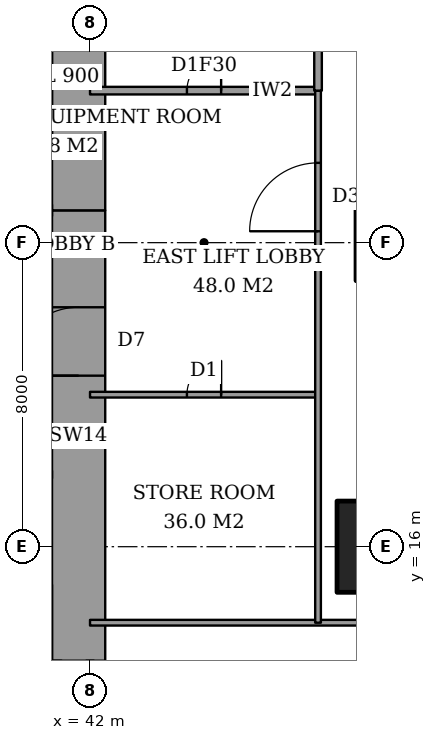
"""IFC4 building model, lengths in metres.
Left out: names, types, materials, properties, quantities, classifications, styles, units other than length and angle.
Written with IfcOpenShell. Run it as: python <this file> out.ifc"""

import sys

from ifc_helpers import new_model, si_unit, direction, frame, frame_2d, origin, origin_2d, place, context, subcontext, project, spatial, rectangle, extrude, element, fill, save


model = new_model("IFC4")
c1 = context("Model", 3, precision=1e-05, world=origin(), true_north=direction((0.0, 1.0)))
c2 = subcontext(c1, "Body", "Model", "MODEL_VIEW")
j1 = project(units=[si_unit("LENGTHUNIT", "METRE"), si_unit("PLANEANGLEUNIT", "RADIAN")], contexts=[c1])
p1 = place(None, origin())
s1 = spatial("IfcSite", under=j1, at=p1, CompositionType="ELEMENT")
p2 = place(p1, origin())
s2 = spatial("IfcBuilding", under=s1, at=p2, CompositionType="ELEMENT")
p3 = place(p2, frame((0.0, 0.0, 11.0)))
s3 = spatial("IfcBuildingStorey", under=s2, at=p3, CompositionType="ELEMENT", Elevation=11.0)
p4 = place(p3, frame((50.0, 16.0, 0.0), z_axis=(0.0, 0.0, 1.0), x_axis=(1.0, 0.0, 0.0)))
e1 = element("IfcColumn", 1, at=p4, inside=s3, PredefinedType="COLUMN", context=c2, shape_type="SweptSolid", body=[
    extrude(rectangle(XDim=3.0, YDim=2.4, at=origin_2d()), origin(), (0.0, 0.0, 1.0), 5.0),
])
p5 = place(p3, frame((41.7, 13.0, 0.0), z_axis=(0.0, 0.0, 1.0), x_axis=(0.0, 1.0, 0.0)))
e2 = element("IfcWall", 2, at=p5, inside=s3, PredefinedType="SHEAR", context=c2, shape_type="SweptSolid", body=[
    extrude(rectangle(XDim=11.85, YDim=1.4, at=frame_2d((5.925, 0.0))), origin(), (0.0, 0.0, 1.0), 5.0),
])
p6 = place(p5, frame((7.5, 0.0, 0.0)))
e3 = element("IfcOpeningElement", 3, at=p6, cuts=e2, PredefinedType="OPENING", context=c2, shape_type="SweptSolid", body=[
    extrude(rectangle(XDim=1.8, YDim=2.4, at=frame_2d((0.9, 1.2))), frame((0.0, 0.71, 0.0), z_axis=(0.0, -1.0, 0.0), x_axis=(1.0, 0.0, 0.0)), (0.0, 0.0, 1.0), 1.42),
])
p7 = place(p3, frame((41.7, 24.85, 0.0), z_axis=(0.0, 0.0, 1.0), x_axis=(0.0, 1.0, 0.0)))
e4 = element("IfcWall", 4, at=p7, inside=s3, PredefinedType="SHEAR", context=c2, shape_type="SweptSolid", body=[
    extrude(rectangle(XDim=10.15, YDim=1.4, at=frame_2d((5.075, 0.0))), origin(), (0.0, 0.0, 1.0), 5.0),
])
p8 = place(p3, frame((42.0, 14.0, 0.0), z_axis=(0.0, 0.0, 1.0), x_axis=(1.0, 0.0, 0.0)))
e5 = element("IfcWall", 5, at=p8, inside=s3, PredefinedType="PARTITIONING", context=c2, shape_type="SweptSolid", body=[
    extrude(rectangle(XDim=32.45, YDim=0.15, at=frame_2d((16.225, 0.0))), origin(), (0.0, 0.0, 1.0), 4.7),
])
p9 = place(p8, frame((11.137, 0.0, 0.0)))
e6 = element("IfcOpeningElement", 6, at=p9, cuts=e5, PredefinedType="OPENING", context=c2, shape_type="SweptSolid", body=[
    extrude(rectangle(XDim=1.0, YDim=2.1, at=frame_2d((0.5, 1.05))), frame((0.0, 0.085, 0.0), z_axis=(0.0, -1.0, 0.0), x_axis=(1.0, 0.0, 0.0)), (0.0, 0.0, 1.0), 0.17),
])
p10 = place(p8, frame((24.663, 0.0, 0.0)))
e7 = element("IfcOpeningElement", 7, at=p10, cuts=e5, PredefinedType="OPENING", context=c2, shape_type="SweptSolid", body=[
    extrude(rectangle(XDim=1.8, YDim=2.1, at=frame_2d((0.9, 1.05))), frame((0.0, 0.085, 0.0), z_axis=(0.0, -1.0, 0.0), x_axis=(1.0, 0.0, 0.0)), (0.0, 0.0, 1.0), 0.17),
])
p11 = place(p3, frame((42.0, 20.0, 0.0), z_axis=(0.0, 0.0, 1.0), x_axis=(1.0, 0.0, 0.0)))
e8 = element("IfcWall", 8, at=p11, inside=s3, PredefinedType="PARTITIONING", context=c2, shape_type="SweptSolid", body=[
    extrude(rectangle(XDim=6.0, YDim=0.15, at=frame_2d((3.0, 0.0))), origin(), (0.0, 0.0, 1.0), 4.7),
])
p12 = place(p11, frame((2.55, 0.0, 0.0)))
e9 = element("IfcOpeningElement", 9, at=p12, cuts=e8, PredefinedType="OPENING", context=c2, shape_type="SweptSolid", body=[
    extrude(rectangle(XDim=0.9, YDim=2.1, at=frame_2d((0.45, 1.05))), frame((0.0, 0.085, 0.0), z_axis=(0.0, -1.0, 0.0), x_axis=(1.0, 0.0, 0.0)), (0.0, 0.0, 1.0), 0.17),
])
p13 = place(p3, frame((42.0, 28.0, 0.0), z_axis=(0.0, 0.0, 1.0), x_axis=(1.0, 0.0, 0.0)))
e10 = element("IfcWall", 10, at=p13, inside=s3, PredefinedType="PARTITIONING", context=c2, shape_type="SweptSolid", body=[
    extrude(rectangle(XDim=6.0, YDim=0.2, at=frame_2d((3.0, 0.0))), origin(), (0.0, 0.0, 1.0), 4.7),
])
p14 = place(p13, frame((2.55, 0.0, 0.0)))
e11 = element("IfcOpeningElement", 11, at=p14, cuts=e10, PredefinedType="OPENING", context=c2, shape_type="SweptSolid", body=[
    extrude(rectangle(XDim=0.9, YDim=2.1, at=frame_2d((0.45, 1.05))), frame((0.0, 0.11, 0.0), z_axis=(0.0, -1.0, 0.0), x_axis=(1.0, 0.0, 0.0)), (0.0, 0.0, 1.0), 0.22),
])
p15 = place(p3, frame((41.15, -0.45, 0.0), z_axis=(0.0, 0.0, 1.0), x_axis=(0.0, 1.0, 0.0)))
e12 = element("IfcWall", 12, at=p15, inside=s3, PredefinedType="PARTITIONING", context=c2, shape_type="SweptSolid", body=[
    extrude(rectangle(XDim=13.45, YDim=0.2, at=frame_2d((6.725, 0.0))), origin(), (0.0, 0.0, 1.0), 4.7),
])
p16 = place(p3, frame((42.0, 9.3, 0.0), z_axis=(0.0, 0.0, 1.0), x_axis=(0.0, 1.0, 0.0)))
e13 = element("IfcWall", 13, at=p16, inside=s3, PredefinedType="PARTITIONING", context=c2, shape_type="SweptSolid", body=[
    extrude(rectangle(XDim=3.7, YDim=0.2, at=frame_2d((1.85, 0.0))), origin(), (0.0, 0.0, 1.0), 4.7),
])
p17 = place(p3, frame((48.0, 28.0, 0.0), z_axis=(0.0, 0.0, 1.0), x_axis=(0.0, 1.0, 0.0)))
e14 = element("IfcWall", 14, at=p17, inside=s3, PredefinedType="PARTITIONING", context=c2, shape_type="SweptSolid", body=[
    extrude(rectangle(XDim=1.4, YDim=0.2, at=frame_2d((0.7, 0.0))), origin(), (0.0, 0.0, 1.0), 4.7),
])
p18 = place(p3, frame((48.0, 14.0, 0.0), z_axis=(0.0, 0.0, 1.0), x_axis=(0.0, 1.0, 0.0)))
e15 = element("IfcWall", 15, at=p18, inside=s3, PredefinedType="PARTITIONING", context=c2, shape_type="SweptSolid", body=[
    extrude(rectangle(XDim=14.0, YDim=0.15, at=frame_2d((7.0, 0.0))), origin(), (0.0, 0.0, 1.0), 4.7),
])
p19 = place(p18, frame((10.3, 0.0, 0.0)))
e16 = element("IfcOpeningElement", 16, at=p19, cuts=e15, PredefinedType="OPENING", context=c2, shape_type="SweptSolid", body=[
    extrude(rectangle(XDim=1.8, YDim=2.1, at=frame_2d((0.9, 1.05))), frame((0.0, 0.085, 0.0), z_axis=(0.0, -1.0, 0.0), x_axis=(1.0, 0.0, 0.0)), (0.0, 0.0, 1.0), 0.17),
])
p20 = place(p3, frame((28.3, 17.9, 0.0), z_axis=(0.0, 0.0, 1.0), x_axis=(1.0, 0.0, 0.0)))
e17 = element("IfcWall", 17, at=p20, inside=s3, PredefinedType="PARTITIONING", context=c2, shape_type="SweptSolid", body=[
    extrude(rectangle(XDim=12.7, YDim=0.2, at=frame_2d((6.35, 0.0))), origin(), (0.0, 0.0, 1.0), 5.0),
])
p21 = place(p20, frame((0.95, 0.0, 0.0)))
e18 = element("IfcOpeningElement", 18, at=p21, cuts=e17, PredefinedType="OPENING", context=c2, shape_type="SweptSolid", body=[
    extrude(rectangle(XDim=1.1, YDim=2.1, at=frame_2d((0.55, 1.05))), frame((0.0, 0.11, 0.0), z_axis=(0.0, -1.0, 0.0), x_axis=(1.0, 0.0, 0.0)), (0.0, 0.0, 1.0), 0.22),
])
p22 = place(p20, frame((4.15, 0.0, 0.0)))
e19 = element("IfcOpeningElement", 19, at=p22, cuts=e17, PredefinedType="OPENING", context=c2, shape_type="SweptSolid", body=[
    extrude(rectangle(XDim=1.1, YDim=2.1, at=frame_2d((0.55, 1.05))), frame((0.0, 0.11, 0.0), z_axis=(0.0, -1.0, 0.0), x_axis=(1.0, 0.0, 0.0)), (0.0, 0.0, 1.0), 0.22),
])
p23 = place(p20, frame((7.35, 0.0, 0.0)))
e20 = element("IfcOpeningElement", 20, at=p23, cuts=e17, PredefinedType="OPENING", context=c2, shape_type="SweptSolid", body=[
    extrude(rectangle(XDim=1.1, YDim=2.1, at=frame_2d((0.55, 1.05))), frame((0.0, 0.11, 0.0), z_axis=(0.0, -1.0, 0.0), x_axis=(1.0, 0.0, 0.0)), (0.0, 0.0, 1.0), 0.22),
])
p24 = place(p20, frame((10.6, 0.0, 0.0)))
e21 = element("IfcOpeningElement", 21, at=p24, cuts=e17, PredefinedType="OPENING", context=c2, shape_type="SweptSolid", body=[
    extrude(rectangle(XDim=1.2, YDim=2.1, at=frame_2d((0.6, 1.05))), frame((0.0, 0.11, 0.0), z_axis=(0.0, -1.0, 0.0), x_axis=(1.0, 0.0, 0.0)), (0.0, 0.0, 1.0), 0.22),
])
p25 = place(p19, origin())
e22 = element("IfcDoor", 22, at=p25, inside=s3, OperationType="DOUBLE_DOOR_DOUBLE_SWING", PredefinedType="DOOR", context=c2, shape_type="SweptSolid", body=[
    extrude(rectangle(XDim=1.8, YDim=2.1, at=frame_2d((0.9, 1.05))), frame((0.0, 0.025, 0.0), z_axis=(0.0, -1.0, 0.0), x_axis=(1.0, 0.0, 0.0)), (0.0, 0.0, 1.0), 0.05),
])
fill(e16, e22)
p26 = place(p14, origin())
e23 = element("IfcDoor", 23, at=p26, inside=s3, OperationType="SINGLE_SWING_LEFT", PredefinedType="DOOR", context=c2, shape_type="SweptSolid", body=[
    extrude(rectangle(XDim=0.9, YDim=2.1, at=frame_2d((0.45, 1.05))), frame((0.0, 0.025, 0.0), z_axis=(0.0, -1.0, 0.0), x_axis=(1.0, 0.0, 0.0)), (0.0, 0.0, 1.0), 0.05),
])
fill(e11, e23)
p27 = place(p12, origin())
e24 = element("IfcDoor", 24, at=p27, inside=s3, OperationType="SINGLE_SWING_LEFT", PredefinedType="DOOR", context=c2, shape_type="SweptSolid", body=[
    extrude(rectangle(XDim=0.9, YDim=2.1, at=frame_2d((0.45, 1.05))), frame((0.0, 0.025, 0.0), z_axis=(0.0, -1.0, 0.0), x_axis=(1.0, 0.0, 0.0)), (0.0, 0.0, 1.0), 0.05),
])
fill(e9, e24)
p28 = place(p6, origin())
e25 = element("IfcDoor", 25, at=p28, inside=s3, OperationType="DOUBLE_DOOR_DOUBLE_SWING", PredefinedType="DOOR", context=c2, shape_type="SweptSolid", body=[
    extrude(rectangle(XDim=1.8, YDim=2.4, at=frame_2d((0.9, 1.2))), frame((0.0, 0.025, 0.0), z_axis=(0.0, -1.0, 0.0), x_axis=(1.0, 0.0, 0.0)), (0.0, 0.0, 1.0), 0.05),
])
fill(e3, e25)
save(model, sys.argv[1])
